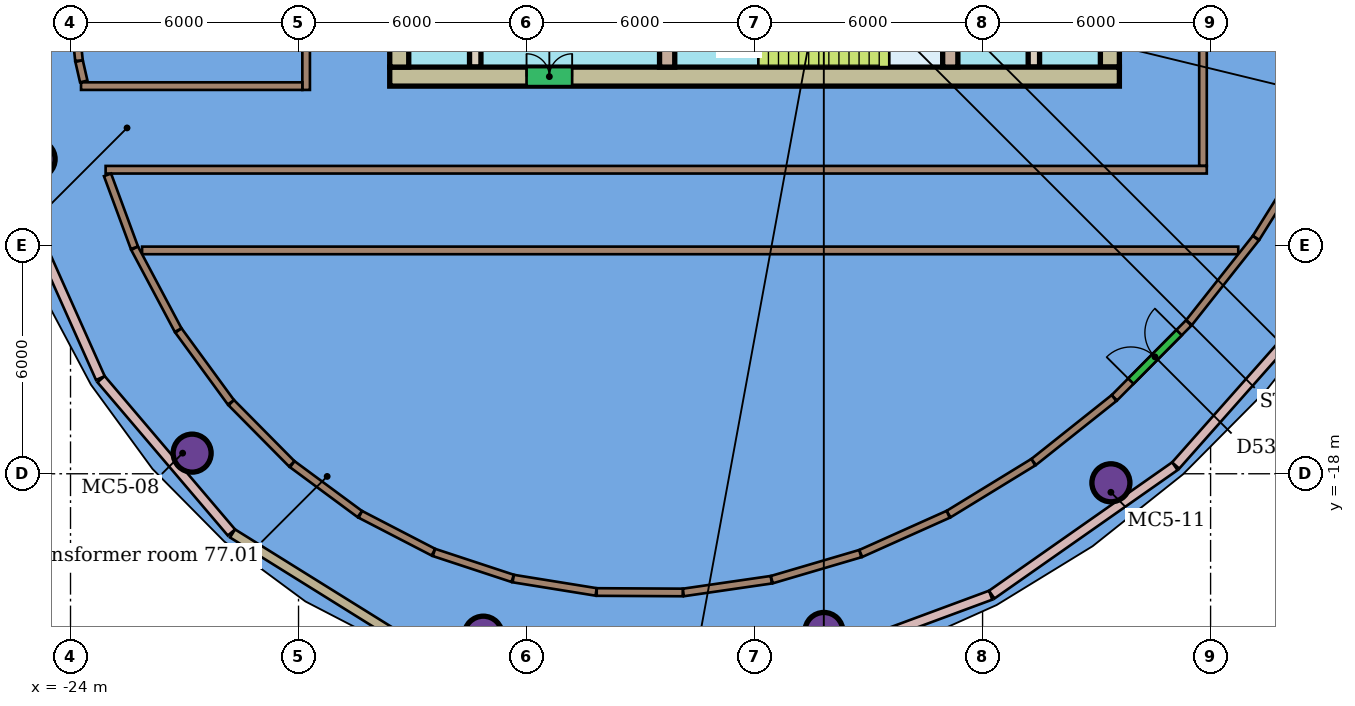
"""IFC4 building model, lengths in metres.
Left out: names, types, materials, properties, quantities, classifications, styles, units other than length and angle.
Written with IfcOpenShell. Run it as: python <this file> out.ifc"""

import sys

from ifc_helpers import new_model, si_unit, direction, frame, frame_2d, origin, origin_2d, place, context, subcontext, project, spatial, rectangle, hollow_circle, extrude, element, fill, save


model = new_model("IFC4")
c1 = context("Model", 3, precision=1e-05, world=origin(), true_north=direction((0.0, 1.0)))
c2 = subcontext(c1, "Body", "Model", "MODEL_VIEW")
j1 = project(units=[si_unit("LENGTHUNIT", "METRE"), si_unit("PLANEANGLEUNIT", "RADIAN")], contexts=[c1])
p1 = place(None, origin())
s1 = spatial("IfcSite", under=j1, at=p1, CompositionType="ELEMENT")
p2 = place(p1, origin())
s2 = spatial("IfcBuilding", under=s1, at=p2, CompositionType="ELEMENT")
p3 = place(p2, frame((0.0, 0.0, 308.7)))
s3 = spatial("IfcBuildingStorey", under=s2, at=p3, CompositionType="ELEMENT", Elevation=308.7)
for number, where, z_axis, x_axis in (
    (1, (-24.906, -9.72, 0.0), (0.0, 0.0, 1.0), (1.0, 0.0, 0.0)),
    (2, (-20.8, -17.457, 0.0), (0.0, 0.0, 1.0), (1.0, 0.0, 0.0)),
    (3, (-13.138, -22.247, 0.0), (0.0, 0.0, 1.0), (1.0, 0.0, 0.0)),
    (4, (-4.175, -22.149, 0.0), (0.0, 0.0, 1.0), (1.0, 0.0, 0.0)),
    (5, (3.377, -18.238, 0.0), (0.0, 0.0, 1.0), (1.0, 0.0, 0.0)),
):
    element("IfcColumn", number, at=place(p3, frame(where, z_axis=z_axis, x_axis=x_axis)), inside=s3, PredefinedType="COLUMN", context=c2, shape_type="SweptSolid", body=[
        extrude(hollow_circle(Radius=0.5, WallThickness=0.04, at=origin_2d()), origin(), (0.0, 0.0, 1.0), 4.0),
    ])
p4 = place(p3, frame((-17.8, -7.9, 0.0), z_axis=(0.0, 0.0, 1.0), x_axis=(0.0, 1.0, 0.0)))
e6 = element("IfcWall", 6, at=p4, inside=s3, PredefinedType="PARTITIONING", context=c2, shape_type="SweptSolid", body=[
    extrude(rectangle(XDim=17.9, YDim=0.2, at=frame_2d((8.95, 0.0))), origin(), (0.0, 0.0, 1.0), 3.65),
])
p5 = place(p3, frame((5.8, -9.9, 0.0), z_axis=(0.0, 0.0, 1.0), x_axis=(0.0, 1.0, 0.0)))
e7 = element("IfcWall", 7, at=p5, inside=s3, PredefinedType="PARTITIONING", context=c2, shape_type="SweptSolid", body=[
    extrude(rectangle(XDim=17.8, YDim=0.2, at=frame_2d((8.9, 0.0))), origin(), (0.0, 0.0, 1.0), 3.65),
])
p6 = place(p5, frame((8.4, 0.0, 0.0)))
e8 = element("IfcOpeningElement", 8, at=p6, cuts=e7, PredefinedType="OPENING", context=c2, shape_type="SweptSolid", body=[
    extrude(rectangle(XDim=1.0, YDim=2.1, at=frame_2d((0.5, 1.05))), frame((0.0, 0.11, 0.0), z_axis=(0.0, -1.0, 0.0), x_axis=(1.0, 0.0, 0.0)), (0.0, 0.0, 1.0), 0.22),
])
p7 = place(p3, frame((-23.076, -10.0, 0.0), z_axis=(0.0, 0.0, 1.0), x_axis=(1.0, 0.0, 0.0)))
e9 = element("IfcWall", 9, at=p7, inside=s3, PredefinedType="PARTITIONING", context=c2, shape_type="SweptSolid", body=[
    extrude(rectangle(XDim=28.976, YDim=0.2, at=frame_2d((14.488, 0.0))), origin(), (0.0, 0.0, 1.0), 3.65),
])
p8 = place(p3, frame((-23.724, -7.8, 0.0), z_axis=(0.0, 0.0, 1.0), x_axis=(1.0, 0.0, 0.0)))
e10 = element("IfcWall", 10, at=p8, inside=s3, PredefinedType="PARTITIONING", context=c2, shape_type="SweptSolid", body=[
    extrude(rectangle(XDim=5.824, YDim=0.2, at=frame_2d((2.912, 0.0))), origin(), (0.0, 0.0, 1.0), 3.65),
])
p9 = place(p3, frame((-23.775, -7.141, 0.0), z_axis=(0.0, 0.0, 1.0), x_axis=(0.2234024776, -0.974726286196, 0.0)))
e11 = element("IfcWall", 11, at=p9, inside=s3, PredefinedType="PARTITIONING", context=c2, shape_type="SweptSolid", body=[
    extrude(rectangle(XDim=0.551, YDim=0.2, at=frame_2d((0.275, 0.0))), origin(), (0.0, 0.0, 1.0), 3.65),
])
p10 = place(p3, frame((-23.777, -7.129, 0.0), z_axis=(0.0, 0.0, 1.0), x_axis=(-0.102877560919, 0.994694027055, 0.0)))
e12 = element("IfcWall", 12, at=p10, inside=s3, PredefinedType="PARTITIONING", context=c2, shape_type="SweptSolid", body=[
    extrude(rectangle(XDim=2.701, YDim=0.2, at=frame_2d((1.35, 0.0))), origin(), (0.0, 0.0, 1.0), 3.65),
])
p11 = place(p10, frame((0.45, 0.0, 0.0)))
e13 = element("IfcOpeningElement", 13, at=p11, cuts=e12, PredefinedType="OPENING", context=c2, shape_type="SweptSolid", body=[
    extrude(rectangle(XDim=1.8, YDim=2.4, at=frame_2d((0.9, 1.2))), frame((0.0, 0.11, 0.0), z_axis=(0.0, -1.0, 0.0), x_axis=(1.0, 0.0, 0.0)), (0.0, 0.0, 1.0), 0.22),
])
p12 = place(p3, frame((-22.117, -12.123, 0.0), z_axis=(0.0, 0.0, 1.0), x_axis=(1.0, 0.0, 0.0)))
e14 = element("IfcWall", 14, at=p12, inside=s3, PredefinedType="PARTITIONING", context=c2, shape_type="SweptSolid", body=[
    extrude(rectangle(XDim=28.845, YDim=0.2, at=frame_2d((14.422, 0.0))), origin(), (0.0, 0.0, 1.0), 3.65),
])
p13 = place(p3, frame((3.468, -16.001, 0.0), z_axis=(0.0, 0.0, 1.0), x_axis=(0.704683921548, 0.70952136734, 0.0)))
e15 = element("IfcWall", 15, at=p13, inside=s3, PredefinedType="PARTITIONING", context=c2, shape_type="SweptSolid", body=[
    extrude(rectangle(XDim=2.776, YDim=0.2, at=frame_2d((1.388, 0.0))), origin(), (0.0, 0.0, 1.0), 3.65),
])
p14 = place(p13, frame((0.617, 0.0, 0.0)))
e16 = element("IfcOpeningElement", 16, at=p14, cuts=e15, PredefinedType="OPENING", context=c2, shape_type="SweptSolid", body=[
    extrude(rectangle(XDim=1.8, YDim=2.4, at=frame_2d((0.9, 1.2))), frame((0.0, 0.11, 0.0), z_axis=(0.0, -1.0, 0.0), x_axis=(1.0, 0.0, 0.0)), (0.0, 0.0, 1.0), 0.22),
])
p15 = place(p3, frame((1.345, -17.689, 0.0), z_axis=(0.0, 0.0, 1.0), x_axis=(0.782656107767, 0.62245434931, 0.0)))
e17 = element("IfcWall", 17, at=p15, inside=s3, PredefinedType="PARTITIONING", context=c2, shape_type="SweptSolid", body=[
    extrude(rectangle(XDim=2.7, YDim=0.2, at=frame_2d((1.35, 0.0))), origin(), (0.0, 0.0, 1.0), 3.65),
])
p16 = place(p3, frame((-0.894, -19.061, 0.0), z_axis=(0.0, 0.0, 1.0), x_axis=(0.852667029926, 0.522454721557, 0.0)))
e18 = element("IfcWall", 18, at=p16, inside=s3, PredefinedType="PARTITIONING", context=c2, shape_type="SweptSolid", body=[
    extrude(rectangle(XDim=2.614, YDim=0.2, at=frame_2d((1.307, 0.0))), origin(), (0.0, 0.0, 1.0), 3.65),
])
p17 = place(p3, frame((-3.206, -20.097, 0.0), z_axis=(0.0, 0.0, 1.0), x_axis=(0.912552955942, 0.408958558538, 0.0)))
e19 = element("IfcWall", 19, at=p17, inside=s3, PredefinedType="PARTITIONING", context=c2, shape_type="SweptSolid", body=[
    extrude(rectangle(XDim=2.521, YDim=0.2, at=frame_2d((1.26, 0.0))), origin(), (0.0, 0.0, 1.0), 3.65),
])
p18 = place(p3, frame((-5.547, -20.786, 0.0), z_axis=(0.0, 0.0, 1.0), x_axis=(0.95934146389, 0.28224803925, 0.0)))
e20 = element("IfcWall", 20, at=p18, inside=s3, PredefinedType="PARTITIONING", context=c2, shape_type="SweptSolid", body=[
    extrude(rectangle(XDim=2.426, YDim=0.2, at=frame_2d((1.213, 0.0))), origin(), (0.0, 0.0, 1.0), 3.65),
])
p19 = place(p3, frame((-7.875, -21.123, 0.0), z_axis=(0.0, 0.0, 1.0), x_axis=(0.989671979467, 0.143350525141, 0.0)))
e21 = element("IfcWall", 21, at=p19, inside=s3, PredefinedType="PARTITIONING", context=c2, shape_type="SweptSolid", body=[
    extrude(rectangle(XDim=2.338, YDim=0.2, at=frame_2d((1.169, 0.0))), origin(), (0.0, 0.0, 1.0), 3.65),
])
p20 = place(p3, frame((-10.154, -21.111, 0.0), z_axis=(0.0, 0.0, 1.0), x_axis=(0.999986603133, -0.005176248997, 0.0)))
e22 = element("IfcWall", 22, at=p20, inside=s3, PredefinedType="PARTITIONING", context=c2, shape_type="SweptSolid", body=[
    extrude(rectangle(XDim=2.264, YDim=0.2, at=frame_2d((1.132, 0.0))), origin(), (0.0, 0.0, 1.0), 3.65),
])
p21 = place(p3, frame((-12.35, -20.757, 0.0), z_axis=(0.0, 0.0, 1.0), x_axis=(0.987257926423, -0.159128208423, 0.0)))
e23 = element("IfcWall", 23, at=p21, inside=s3, PredefinedType="PARTITIONING", context=c2, shape_type="SweptSolid", body=[
    extrude(rectangle(XDim=2.209, YDim=0.2, at=frame_2d((1.104, 0.0))), origin(), (0.0, 0.0, 1.0), 3.65),
])
p22 = place(p3, frame((-14.437, -20.07, 0.0), z_axis=(0.0, 0.0, 1.0), x_axis=(0.949852302688, -0.312698901627, 0.0)))
e24 = element("IfcWall", 24, at=p22, inside=s3, PredefinedType="PARTITIONING", context=c2, shape_type="SweptSolid", body=[
    extrude(rectangle(XDim=2.181, YDim=0.2, at=frame_2d((1.09, 0.0))), origin(), (0.0, 0.0, 1.0), 3.65),
])
p23 = place(p3, frame((-16.373, -19.068, 0.0), z_axis=(0.0, 0.0, 1.0), x_axis=(0.888068415533, -0.45971131086, 0.0)))
e25 = element("IfcWall", 25, at=p23, inside=s3, PredefinedType="PARTITIONING", context=c2, shape_type="SweptSolid", body=[
    extrude(rectangle(XDim=2.165, YDim=0.2, at=frame_2d((1.082, 0.0))), origin(), (0.0, 0.0, 1.0), 3.65),
])
p24 = place(p3, frame((-18.165, -17.748, 0.0), z_axis=(0.0, 0.0, 1.0), x_axis=(0.80443326696, -0.594043027909, 0.0)))
e26 = element("IfcWall", 26, at=p24, inside=s3, PredefinedType="PARTITIONING", context=c2, shape_type="SweptSolid", body=[
    extrude(rectangle(XDim=2.209, YDim=0.2, at=frame_2d((1.105, 0.0))), origin(), (0.0, 0.0, 1.0), 3.65),
])
p25 = place(p3, frame((-19.77, -16.129, 0.0), z_axis=(0.0, 0.0, 1.0), x_axis=(0.703376280453, -0.710817703843, 0.0)))
e27 = element("IfcWall", 27, at=p25, inside=s3, PredefinedType="PARTITIONING", context=c2, shape_type="SweptSolid", body=[
    extrude(rectangle(XDim=2.264, YDim=0.2, at=frame_2d((1.132, 0.0))), origin(), (0.0, 0.0, 1.0), 3.65),
])
p26 = place(p3, frame((-21.16, -14.231, 0.0), z_axis=(0.0, 0.0, 1.0), x_axis=(0.590082027637, -0.807343297897, 0.0)))
e28 = element("IfcWall", 28, at=p26, inside=s3, PredefinedType="PARTITIONING", context=c2, shape_type="SweptSolid", body=[
    extrude(rectangle(XDim=2.338, YDim=0.2, at=frame_2d((1.169, 0.0))), origin(), (0.0, 0.0, 1.0), 3.65),
])
p27 = place(p3, frame((-22.314, -12.065, 0.0), z_axis=(0.0, 0.0, 1.0), x_axis=(0.469606334902, -0.882875920059, 0.0)))
e29 = element("IfcWall", 29, at=p27, inside=s3, PredefinedType="PARTITIONING", context=c2, shape_type="SweptSolid", body=[
    extrude(rectangle(XDim=2.44, YDim=0.2, at=frame_2d((1.22, 0.0))), origin(), (0.0, 0.0, 1.0), 3.65),
])
p28 = place(p3, frame((5.432, -14.023, 0.0), z_axis=(0.0, 0.0, 1.0), x_axis=(0.620327979869, 0.784342525553, 0.0)))
e30 = element("IfcWall", 30, at=p28, inside=s3, PredefinedType="PARTITIONING", context=c2, shape_type="SweptSolid", body=[
    extrude(rectangle(XDim=2.836, YDim=0.2, at=frame_2d((1.418, 0.0))), origin(), (0.0, 0.0, 1.0), 3.65),
])
p29 = place(p3, frame((7.198, -11.791, 0.0), z_axis=(0.0, 0.0, 1.0), x_axis=(0.530761457751, 0.847521253401, 0.0)))
e31 = element("IfcWall", 31, at=p29, inside=s3, PredefinedType="PARTITIONING", context=c2, shape_type="SweptSolid", body=[
    extrude(rectangle(XDim=2.877, YDim=0.2, at=frame_2d((1.438, 0.0))), origin(), (0.0, 0.0, 1.0), 3.65),
])
p30 = place(p3, frame((-23.026, -10.135, 0.0), z_axis=(0.0, 0.0, 1.0), x_axis=(0.346197844841, -0.938161527791, 0.0)))
e32 = element("IfcWall", 32, at=p30, inside=s3, PredefinedType="PARTITIONING", context=c2, shape_type="SweptSolid", body=[
    extrude(rectangle(XDim=2.044, YDim=0.2, at=frame_2d((1.022, 0.0))), origin(), (0.0, 0.0, 1.0), 3.65),
])
p31 = place(p3, frame((-25.49, -10.39, 0.0), z_axis=(0.0, 0.0, 1.0), x_axis=(0.407989751163, -0.912986507538, 0.0)))
e33 = element("IfcWall", 33, at=p31, inside=s3, PredefinedType="SOLIDWALL", context=c2, shape_type="SweptSolid", body=[
    extrude(rectangle(XDim=5.577, YDim=0.25, at=frame_2d((2.789, 0.0))), origin(), (0.0, 0.0, 1.0), 3.7),
])
p32 = place(p3, frame((-23.196, -15.511, 0.0), z_axis=(0.0, 0.0, 1.0), x_axis=(0.647893308308, -0.761731094973, 0.0)))
e34 = element("IfcWall", 34, at=p32, inside=s3, PredefinedType="SOLIDWALL", context=c2, shape_type="SweptSolid", body=[
    extrude(rectangle(XDim=5.295, YDim=0.25, at=frame_2d((2.647, 0.0))), origin(), (0.0, 0.0, 1.0), 3.7),
])
p33 = place(p3, frame((-19.737, -19.57, 0.0), z_axis=(0.0, 0.0, 1.0), x_axis=(0.84872546146, -0.528833708333, 0.0)))
e35 = element("IfcWall", 35, at=p33, inside=s3, PredefinedType="SOLIDWALL", context=c2, shape_type="SweptSolid", body=[
    extrude(rectangle(XDim=5.125, YDim=0.25, at=frame_2d((2.562, 0.0))), origin(), (0.0, 0.0, 1.0), 4.0),
])
p34 = place(p3, frame((-5.017, -23.131, 0.0), z_axis=(0.0, 0.0, 1.0), x_axis=(0.937764073403, 0.34727300879, 0.0)))
e36 = element("IfcWall", 36, at=p34, inside=s3, PredefinedType="SOLIDWALL", context=c2, shape_type="SweptSolid", body=[
    extrude(rectangle(XDim=5.577, YDim=0.25, at=frame_2d((2.789, 0.0))), origin(), (0.0, 0.0, 1.0), 3.7),
])
p35 = place(p3, frame((0.241, -21.18, 0.0), z_axis=(0.0, 0.0, 1.0), x_axis=(0.818761962214, 0.574133128492, 0.0)))
e37 = element("IfcWall", 37, at=p35, inside=s3, PredefinedType="SOLIDWALL", context=c2, shape_type="SweptSolid", body=[
    extrude(rectangle(XDim=5.885, YDim=0.25, at=frame_2d((2.943, 0.0))), origin(), (0.0, 0.0, 1.0), 3.7),
])
p36 = place(p3, frame((5.081, -17.781, 0.0), z_axis=(0.0, 0.0, 1.0), x_axis=(0.663232601491, 0.748413332537, 0.0)))
e38 = element("IfcWall", 38, at=p36, inside=s3, PredefinedType="SOLIDWALL", context=c2, shape_type="SweptSolid", body=[
    extrude(rectangle(XDim=6.139, YDim=0.25, at=frame_2d((3.07, 0.0))), origin(), (0.0, 0.0, 1.0), 3.7),
])
p37 = place(p3, frame((-15.6, -7.55, 0.0), z_axis=(0.0, 0.0, 1.0), x_axis=(1.0, 0.0, 0.0)))
e39 = element("IfcWall", 39, at=p37, inside=s3, PredefinedType="SHEAR", context=c2, shape_type="SweptSolid", body=[
    extrude(rectangle(XDim=19.2, YDim=0.5, at=frame_2d((9.6, 0.0))), origin(), (0.0, 0.0, 1.0), 3.9),
])
p38 = place(p37, frame((3.6, 0.0, 0.0)))
e40 = element("IfcOpeningElement", 40, at=p38, cuts=e39, PredefinedType="OPENING", context=c2, shape_type="SweptSolid", body=[
    extrude(rectangle(XDim=1.2, YDim=2.1, at=frame_2d((0.6, 1.05))), frame((0.0, 0.26, 0.0), z_axis=(0.0, -1.0, 0.0), x_axis=(1.0, 0.0, 0.0)), (0.0, 0.0, 1.0), 0.52),
])
p39 = place(p3, frame((-15.35, 7.3, 0.0), z_axis=(0.0, 0.0, 1.0), x_axis=(0.0, -1.0, 0.0)))
e41 = element("IfcWall", 41, at=p39, inside=s3, PredefinedType="SHEAR", context=c2, shape_type="SweptSolid", body=[
    extrude(rectangle(XDim=14.6, YDim=0.5, at=frame_2d((7.3, 0.0))), origin(), (0.0, 0.0, 1.0), 3.9),
])
p40 = place(p39, frame((10.6, 0.0, 0.0)))
e42 = element("IfcOpeningElement", 42, at=p40, cuts=e41, PredefinedType="OPENING", context=c2, shape_type="SweptSolid", body=[
    extrude(rectangle(XDim=1.2, YDim=2.1, at=frame_2d((0.6, 1.05))), frame((0.0, 0.26, 0.0), z_axis=(0.0, -1.0, 0.0), x_axis=(1.0, 0.0, 0.0)), (0.0, 0.0, 1.0), 0.52),
])
p41 = place(p39, frame((2.8, 0.0, 0.0)))
e43 = element("IfcOpeningElement", 43, at=p41, cuts=e41, PredefinedType="OPENING", context=c2, shape_type="SweptSolid", body=[
    extrude(rectangle(XDim=1.2, YDim=2.1, at=frame_2d((0.6, 1.05))), frame((0.0, 0.26, 0.0), z_axis=(0.0, -1.0, 0.0), x_axis=(1.0, 0.0, 0.0)), (0.0, 0.0, 1.0), 0.52),
])
p42 = place(p3, frame((3.35, -7.3, 0.0), z_axis=(0.0, 0.0, 1.0), x_axis=(0.0, 1.0, 0.0)))
e44 = element("IfcWall", 44, at=p42, inside=s3, PredefinedType="SHEAR", context=c2, shape_type="SweptSolid", body=[
    extrude(rectangle(XDim=14.6, YDim=0.5, at=frame_2d((7.3, 0.0))), origin(), (0.0, 0.0, 1.0), 3.9),
])
p43 = place(p42, frame((2.8, 0.0, 0.0)))
e45 = element("IfcOpeningElement", 45, at=p43, cuts=e44, PredefinedType="OPENING", context=c2, shape_type="SweptSolid", body=[
    extrude(rectangle(XDim=1.2, YDim=2.1, at=frame_2d((0.6, 1.05))), frame((0.0, 0.26, 0.0), z_axis=(0.0, -1.0, 0.0), x_axis=(1.0, 0.0, 0.0)), (0.0, 0.0, 1.0), 0.52),
])
p44 = place(p42, frame((10.6, 0.0, 0.0)))
e46 = element("IfcOpeningElement", 46, at=p44, cuts=e44, PredefinedType="OPENING", context=c2, shape_type="SweptSolid", body=[
    extrude(rectangle(XDim=1.2, YDim=2.1, at=frame_2d((0.6, 1.05))), frame((0.0, 0.26, 0.0), z_axis=(0.0, -1.0, 0.0), x_axis=(1.0, 0.0, 0.0)), (0.0, 0.0, 1.0), 0.52),
])
p45 = place(p3, frame((-13.35, 7.3, 0.0), z_axis=(0.0, 0.0, 1.0), x_axis=(0.0, -1.0, 0.0)))
e47 = element("IfcWall", 47, at=p45, inside=s3, PredefinedType="SHEAR", context=c2, shape_type="SweptSolid", body=[
    extrude(rectangle(XDim=14.6, YDim=0.3, at=frame_2d((7.3, 0.0))), origin(), (0.0, 0.0, 1.0), 3.9),
])
p46 = place(p45, frame((6.55, 0.0, 0.0)))
e48 = element("IfcOpeningElement", 48, at=p46, cuts=e47, PredefinedType="OPENING", context=c2, shape_type="SweptSolid", body=[
    extrude(rectangle(XDim=1.5, YDim=2.1, at=frame_2d((0.75, 1.05))), frame((0.0, 0.16, 0.0), z_axis=(0.0, -1.0, 0.0), x_axis=(1.0, 0.0, 0.0)), (0.0, 0.0, 1.0), 0.32),
])
p47 = place(p3, frame((1.35, -7.3, 0.0), z_axis=(0.0, 0.0, 1.0), x_axis=(0.0, 1.0, 0.0)))
e49 = element("IfcWall", 49, at=p47, inside=s3, PredefinedType="SHEAR", context=c2, shape_type="SweptSolid", body=[
    extrude(rectangle(XDim=14.6, YDim=0.3, at=frame_2d((7.3, 0.0))), origin(), (0.0, 0.0, 1.0), 3.9),
])
p48 = place(p47, frame((1.21, 0.0, 0.0)))
e50 = element("IfcOpeningElement", 50, at=p48, cuts=e49, PredefinedType="OPENING", context=c2, shape_type="SweptSolid", body=[
    extrude(rectangle(XDim=1.0, YDim=2.1, at=frame_2d((0.5, 1.05))), frame((0.0, 0.16, 0.0), z_axis=(0.0, -1.0, 0.0), x_axis=(1.0, 0.0, 0.0)), (0.0, 0.0, 1.0), 0.32),
])
p49 = place(p47, frame((6.55, 0.0, 0.0)))
e51 = element("IfcOpeningElement", 51, at=p49, cuts=e49, PredefinedType="OPENING", context=c2, shape_type="SweptSolid", body=[
    extrude(rectangle(XDim=1.5, YDim=2.1, at=frame_2d((0.75, 1.05))), frame((0.0, 0.16, 0.0), z_axis=(0.0, -1.0, 0.0), x_axis=(1.0, 0.0, 0.0)), (0.0, 0.0, 1.0), 0.32),
])
p50 = place(p3, frame((-8.3, -3.88, 0.0), z_axis=(0.0, 0.0, 1.0), x_axis=(0.0, -1.0, 0.0)))
e52 = element("IfcWall", 52, at=p50, inside=s3, PredefinedType="SHEAR", context=c2, shape_type="SweptSolid", body=[
    extrude(rectangle(XDim=3.42, YDim=0.4, at=frame_2d((1.71, 0.0))), origin(), (0.0, 0.0, 1.0), 3.9),
])
p51 = place(p50, frame((1.11, 0.0, 0.0)))
e53 = element("IfcOpeningElement", 53, at=p51, cuts=e52, PredefinedType="OPENING", context=c2, shape_type="SweptSolid", body=[
    extrude(rectangle(XDim=1.2, YDim=2.1, at=frame_2d((0.6, 1.05))), frame((0.0, 0.21, 0.0), z_axis=(0.0, -1.0, 0.0), x_axis=(1.0, 0.0, 0.0)), (0.0, 0.0, 1.0), 0.42),
])
p52 = place(p3, frame((-0.85, -3.88, 0.0), z_axis=(0.0, 0.0, 1.0), x_axis=(0.0, -1.0, 0.0)))
e54 = element("IfcWall", 54, at=p52, inside=s3, PredefinedType="SHEAR", context=c2, shape_type="SweptSolid", body=[
    extrude(rectangle(XDim=3.42, YDim=0.4, at=frame_2d((1.71, 0.0))), origin(), (0.0, 0.0, 1.0), 3.9),
])
p53 = place(p14, origin())
e55 = element("IfcDoor", 55, at=p53, inside=s3, OperationType="DOUBLE_DOOR_SINGLE_SWING", PredefinedType="DOOR", context=c2, shape_type="SweptSolid", body=[
    extrude(rectangle(XDim=1.8, YDim=2.4, at=frame_2d((0.9, 1.2))), frame((0.0, 0.025, 0.0), z_axis=(0.0, -1.0, 0.0), x_axis=(1.0, 0.0, 0.0)), (0.0, 0.0, 1.0), 0.05),
])
fill(e16, e55)
p54 = place(p38, origin())
e56 = element("IfcDoor", 56, at=p54, inside=s3, OperationType="DOUBLE_DOOR_SINGLE_SWING", PredefinedType="NOTDEFINED", context=c2, shape_type="SweptSolid", body=[
    extrude(rectangle(XDim=1.2, YDim=2.1, at=frame_2d((0.6, 1.05))), frame((0.0, 0.025, 0.0), z_axis=(0.0, -1.0, 0.0), x_axis=(1.0, 0.0, 0.0)), (0.0, 0.0, 1.0), 0.05),
])
fill(e40, e56)
save(model, sys.argv[1])
